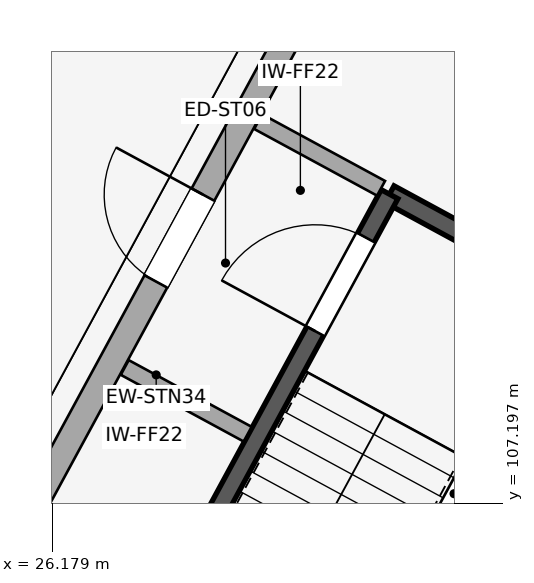
"""IFC4 building model, lengths in metres.
Left out: names, types, materials, properties, quantities, classifications, styles, units other than length and angle.
Written with IfcOpenShell. Run it as: python <this file> out.ifc"""

import sys

from ifc_helpers import new_model, si_unit, direction, frame, frame_2d, origin, place, context, subcontext, project, spatial, rectangle, extrude, element, fill, save


model = new_model("IFC4")
c1 = context("Model", 3, precision=1e-05, world=origin(), true_north=direction((0.0, 1.0)))
c2 = subcontext(c1, "Body", "Model", "MODEL_VIEW")
j1 = project(units=[si_unit("LENGTHUNIT", "METRE"), si_unit("PLANEANGLEUNIT", "RADIAN")], contexts=[c1])
p1 = place(None, origin())
s1 = spatial("IfcSite", under=j1, at=p1, CompositionType="ELEMENT")
p2 = place(p1, origin())
s2 = spatial("IfcBuilding", under=s1, at=p2, CompositionType="ELEMENT")
p3 = place(p2, origin())
s3 = spatial("IfcBuildingStorey", under=s2, at=p3, CompositionType="ELEMENT", Elevation=0.0)
p4 = place(p3, frame((30.24, 115.096, 0.0), z_axis=(0.0, 0.0, 1.0), x_axis=(-0.47689360532, -0.878961028263, 0.0)))
e1 = element("IfcWall", 1, at=p4, inside=s3, PredefinedType="STANDARD", context=c2, shape_type="SweptSolid", body=[
    extrude(rectangle(XDim=18.562, YDim=0.34, at=frame_2d((9.281, 0.0))), origin(), (0.0, 0.0, 1.0), 3.85),
])
p5 = place(p4, frame((4.36, 0.0, 0.0)))
e2 = element("IfcOpeningElement", 2, at=p5, cuts=e1, PredefinedType="OPENING", context=c2, shape_type="SweptSolid", body=[
    extrude(rectangle(XDim=1.3, YDim=2.2, at=frame_2d((0.65, 1.1))), frame((0.0, 0.18, 0.0), z_axis=(0.0, -1.0, 0.0), x_axis=(1.0, 0.0, 0.0)), (0.0, 0.0, 1.0), 0.36),
])
p6 = place(p4, frame((11.081, 0.0, 0.0)))
e3 = element("IfcOpeningElement", 3, at=p6, cuts=e1, PredefinedType="OPENING", context=c2, shape_type="SweptSolid", body=[
    extrude(rectangle(XDim=2.35, YDim=2.4, at=frame_2d((1.175, 1.2))), frame((0.0, 0.18, 0.0), z_axis=(0.0, -1.0, 0.0), x_axis=(1.0, 0.0, 0.0)), (0.0, 0.0, 1.0), 0.36),
])
p7 = place(p3, frame((35.23, 108.765, 0.0), z_axis=(0.0, 0.0, 1.0), x_axis=(-0.878941993928, 0.476928685769, 0.0)))
e4 = element("IfcWall", 4, at=p7, inside=s3, PredefinedType="SHEAR", context=c2, shape_type="SweptSolid", body=[
    extrude(rectangle(XDim=5.25, YDim=0.25, at=frame_2d((2.625, 0.0))), origin(), (0.0, 0.0, 1.0), 5.1),
])
p8 = place(p3, frame((30.615, 111.269, 0.0), z_axis=(0.0, 0.0, 1.0), x_axis=(-0.476876856974, -0.878970115125, 0.0)))
e5 = element("IfcWall", 5, at=p8, inside=s3, PredefinedType="SHEAR", context=c2, shape_type="SweptSolid", body=[
    extrude(rectangle(XDim=10.45, YDim=0.25, at=frame_2d((5.225, 0.0))), origin(), (0.0, 0.0, 1.0), 5.1),
])
p9 = place(p8, frame((0.65, 0.0, 0.0)))
e6 = element("IfcOpeningElement", 6, at=p9, cuts=e5, PredefinedType="OPENING", context=c2, shape_type="SweptSolid", body=[
    extrude(rectangle(XDim=1.4, YDim=2.2, at=frame_2d((0.7, 1.1))), frame((0.0, 0.135, 0.0), z_axis=(0.0, -1.0, 0.0), x_axis=(1.0, 0.0, 0.0)), (0.0, 0.0, 1.0), 0.27),
])
p10 = place(p3, frame((30.246, 99.58, 0.0), z_axis=(0.0, 0.0, 1.0), x_axis=(0.476886649814, 0.878964802042, 0.0)))
e7 = element("IfcWall", 7, at=p10, inside=s3, PredefinedType="SHEAR", context=c2, shape_type="SweptSolid", body=[
    extrude(rectangle(XDim=10.45, YDim=0.25, at=frame_2d((5.225, 0.0))), origin(), (0.0, 0.0, 1.0), 5.1),
])
p11 = place(p3, frame((30.504, 111.346, 0.0), z_axis=(0.0, 0.0, 1.0), x_axis=(-0.878928142612, 0.476954211769, 0.0)))
e8 = element("IfcWall", 8, at=p11, inside=s3, PredefinedType="PARTITIONING", context=c2, shape_type="SweptSolid", body=[
    extrude(rectangle(XDim=1.84, YDim=0.22, at=frame_2d((0.92, 0.0))), origin(), (0.0, 0.0, 1.0), 3.69),
])
p12 = place(p3, frame((28.749, 108.112, 0.0), z_axis=(0.0, 0.0, 1.0), x_axis=(-0.878958326558, 0.47689858479, 0.0)))
e9 = element("IfcWall", 9, at=p12, inside=s3, PredefinedType="PARTITIONING", context=c2, shape_type="SweptSolid", body=[
    extrude(rectangle(XDim=1.84, YDim=0.22, at=frame_2d((0.92, 0.0))), origin(), (0.0, 0.0, 1.0), 3.69),
])
p13 = place(p5, frame((1.3, 0.0, 0.0), z_axis=(0.0, 0.0, 1.0), x_axis=(-1.0, 0.0, 0.0)))
e10 = element("IfcDoor", 10, at=p13, inside=s3, OperationType="SINGLE_SWING_RIGHT", PredefinedType="DOOR", context=c2, shape_type="SweptSolid", body=[
    extrude(rectangle(XDim=1.3, YDim=2.2, at=frame_2d((0.65, 1.1))), frame((0.0, 0.025, 0.0), z_axis=(0.0, -1.0, 0.0), x_axis=(1.0, 0.0, 0.0)), (0.0, 0.0, 1.0), 0.05),
])
fill(e2, e10)
p14 = place(p9, frame((1.4, 0.0, 0.0), z_axis=(0.0, 0.0, 1.0), x_axis=(-1.0, 0.0, 0.0)))
e11 = element("IfcDoor", 11, at=p14, inside=s3, OperationType="SINGLE_SWING_LEFT", PredefinedType="DOOR", context=c2, shape_type="SweptSolid", body=[
    extrude(rectangle(XDim=1.4, YDim=2.2, at=frame_2d((0.7, 1.1))), frame((0.0, 0.025, 0.0), z_axis=(0.0, -1.0, 0.0), x_axis=(1.0, 0.0, 0.0)), (0.0, 0.0, 1.0), 0.05),
])
fill(e6, e11)
save(model, sys.argv[1])
